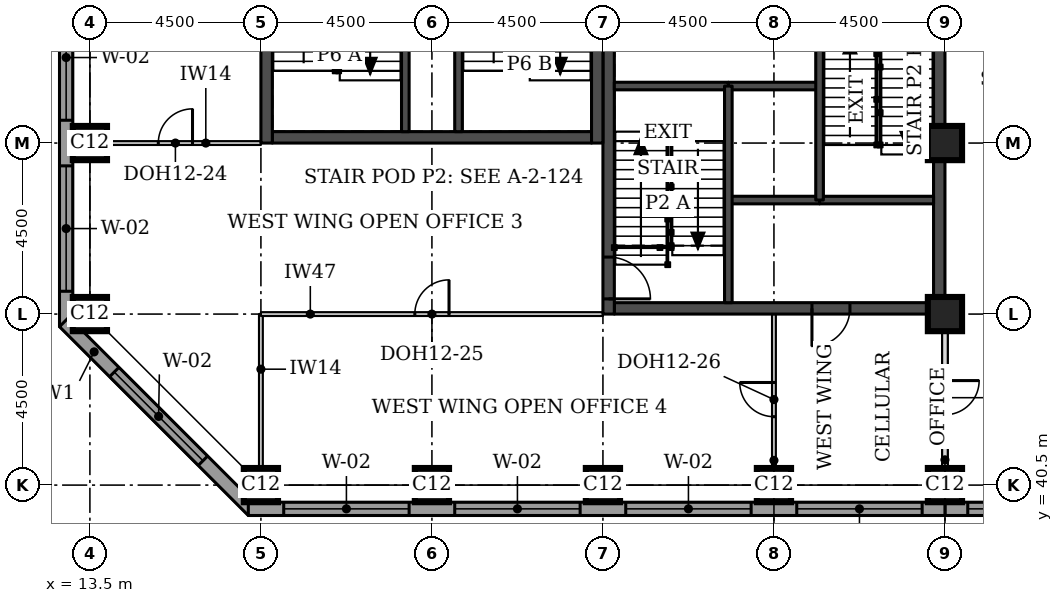
"""IFC4 building model, lengths in metres.
Left out: names, types, materials, properties, quantities, classifications, styles, units other than length and angle.
Written with IfcOpenShell. Run it as: python <this file> out.ifc"""

import sys

from ifc_helpers import new_model, si_unit, direction, frame, frame_2d, origin, origin_2d, place, context, subcontext, project, spatial, rectangle, extrude, element, fill, save


model = new_model("IFC4")
c1 = context("Model", 3, precision=1e-05, world=origin(), true_north=direction((0.0, 1.0)))
c2 = subcontext(c1, "Body", "Model", "MODEL_VIEW")
j1 = project(units=[si_unit("LENGTHUNIT", "METRE"), si_unit("PLANEANGLEUNIT", "RADIAN")], contexts=[c1])
p1 = place(None, origin())
s1 = spatial("IfcSite", under=j1, at=p1, CompositionType="ELEMENT")
p2 = place(p1, origin())
s2 = spatial("IfcBuilding", under=s1, at=p2, CompositionType="ELEMENT")
p3 = place(p2, frame((0.0, 0.0, 252.6)))
s3 = spatial("IfcBuildingStorey", under=s2, at=p3, CompositionType="ELEMENT", Elevation=252.6)
for number, where, z_axis, x_axis in (
    (1, (18.0, 40.5, 0.0), (0.0, 0.0, 1.0), (1.0, 0.0, 0.0)),
    (2, (22.5, 40.5, 0.0), (0.0, 0.0, 1.0), (1.0, 0.0, 0.0)),
    (3, (27.0, 40.5, 0.0), (0.0, 0.0, 1.0), (1.0, 0.0, 0.0)),
    (4, (31.5, 40.5, 0.0), (0.0, 0.0, 1.0), (1.0, 0.0, 0.0)),
    (5, (36.0, 40.5, 0.0), (0.0, 0.0, 1.0), (1.0, 0.0, 0.0)),
    (6, (13.5, 45.0, 0.0), (0.0, 0.0, 1.0), (1.0, 0.0, 0.0)),
    (7, (36.0, 45.0, 0.0), (0.0, 0.0, 1.0), (1.0, 0.0, 0.0)),
    (8, (13.5, 49.5, 0.0), (0.0, 0.0, 1.0), (1.0, 0.0, 0.0)),
    (9, (36.0, 49.5, 0.0), (0.0, 0.0, 1.0), (1.0, 0.0, 0.0)),
):
    element("IfcColumn", number, at=place(p3, frame(where, z_axis=z_axis, x_axis=x_axis)), inside=s3, PredefinedType="COLUMN", context=c2, shape_type="SweptSolid", body=[
        extrude(rectangle(XDim=0.9, YDim=0.9, at=origin_2d()), origin(), (0.0, 0.0, 1.0), 3.7),
    ])
p4 = place(p3, frame((27.3, 45.15, 0.0), z_axis=(0.0, 0.0, 1.0), x_axis=(1.0, 0.0, 0.0)))
e10 = element("IfcWall", 10, at=p4, inside=s3, PredefinedType="SHEAR", context=c2, shape_type="SweptSolid", body=[
    extrude(rectangle(XDim=8.4, YDim=0.3, at=frame_2d((4.2, 0.0))), origin(), (0.0, 0.0, 1.0), 3.7),
])
p5 = place(p4, frame((5.2, 0.0, 0.0)))
e11 = element("IfcOpeningElement", 11, at=p5, cuts=e10, PredefinedType="OPENING", context=c2, shape_type="SweptSolid", body=[
    extrude(rectangle(XDim=1.0, YDim=2.1, at=frame_2d((0.5, 1.05))), frame((0.0, 0.16, 0.0), z_axis=(0.0, -1.0, 0.0), x_axis=(1.0, 0.0, 0.0)), (0.0, 0.0, 1.0), 0.32),
])
p6 = place(p3, frame((27.15, 45.0, 0.0), z_axis=(0.0, 0.0, 1.0), x_axis=(0.0, 1.0, 0.0)))
e12 = element("IfcWall", 12, at=p6, inside=s3, PredefinedType="SHEAR", context=c2, shape_type="SweptSolid", body=[
    extrude(rectangle(XDim=9.0, YDim=0.3, at=frame_2d((4.5, 0.0))), origin(), (0.0, 0.0, 1.0), 3.7),
])
p7 = place(p6, frame((0.4, 0.0, 0.0)))
e13 = element("IfcOpeningElement", 13, at=p7, cuts=e12, PredefinedType="OPENING", context=c2, shape_type="SweptSolid", body=[
    extrude(rectangle(XDim=1.1, YDim=2.1, at=frame_2d((0.55, 1.05))), frame((0.0, 0.16, 0.0), z_axis=(0.0, -1.0, 0.0), x_axis=(1.0, 0.0, 0.0)), (0.0, 0.0, 1.0), 0.32),
])
p8 = place(p3, frame((35.85, 45.0, 0.0), z_axis=(0.0, 0.0, 1.0), x_axis=(0.0, 1.0, 0.0)))
e14 = element("IfcWall", 14, at=p8, inside=s3, PredefinedType="SHEAR", context=c2, shape_type="SweptSolid", body=[
    extrude(rectangle(XDim=9.0, YDim=0.3, at=frame_2d((4.5, 0.0))), origin(), (0.0, 0.0, 1.0), 3.7),
])
p9 = place(p3, frame((18.3, 49.65, 0.0), z_axis=(0.0, 0.0, 1.0), x_axis=(1.0, 0.0, 0.0)))
e15 = element("IfcWall", 15, at=p9, inside=s3, PredefinedType="SHEAR", context=c2, shape_type="SweptSolid", body=[
    extrude(rectangle(XDim=8.4, YDim=0.3, at=frame_2d((4.2, 0.0))), origin(), (0.0, 0.0, 1.0), 3.7),
])
p10 = place(p3, frame((18.15, 49.5, 0.0), z_axis=(0.0, 0.0, 1.0), x_axis=(0.0, 1.0, 0.0)))
e16 = element("IfcWall", 16, at=p10, inside=s3, PredefinedType="SHEAR", context=c2, shape_type="SweptSolid", body=[
    extrude(rectangle(XDim=9.0, YDim=0.3, at=frame_2d((4.5, 0.0))), origin(), (0.0, 0.0, 1.0), 3.7),
])
p11 = place(p3, frame((26.85, 49.5, 0.0), z_axis=(0.0, 0.0, 1.0), x_axis=(0.0, 1.0, 0.0)))
e17 = element("IfcWall", 17, at=p11, inside=s3, PredefinedType="SHEAR", context=c2, shape_type="SweptSolid", body=[
    extrude(rectangle(XDim=9.0, YDim=0.3, at=frame_2d((4.5, 0.0))), origin(), (0.0, 0.0, 1.0), 3.7),
])
p12 = place(p11, frame((6.6, 0.0, 0.0)))
e18 = element("IfcOpeningElement", 18, at=p12, cuts=e17, PredefinedType="OPENING", context=c2, shape_type="SweptSolid", body=[
    extrude(rectangle(XDim=1.8, YDim=2.1, at=frame_2d((0.9, 1.05))), frame((0.0, 0.16, 0.0), z_axis=(0.0, -1.0, 0.0), x_axis=(1.0, 0.0, 0.0)), (0.0, 0.0, 1.0), 0.32),
])
p13 = place(p3, frame((36.0, 39.875, 0.0), z_axis=(0.0, 0.0, 1.0), x_axis=(1.0, 0.0, 0.0)))
e19 = element("IfcWall", 19, at=p13, inside=s3, PredefinedType="STANDARD", context=c2, shape_type="SweptSolid", body=[
    extrude(rectangle(XDim=36.331, YDim=0.35, at=frame_2d((18.166, 0.0))), origin(), (0.0, 0.0, 1.0), 3.525),
])
p14 = place(p13, frame((0.6, 0.0, 0.9)))
e20 = element("IfcOpeningElement", 20, at=p14, cuts=e19, PredefinedType="OPENING", context=c2, shape_type="SweptSolid", body=[
    extrude(rectangle(XDim=3.3, YDim=1.9, at=frame_2d((1.65, 0.95))), frame((0.0, 0.185, 0.0), z_axis=(0.0, -1.0, 0.0), x_axis=(1.0, 0.0, 0.0)), (0.0, 0.0, 1.0), 0.37),
])
p15 = place(p13, frame((5.1, 0.0, 0.9)))
e21 = element("IfcOpeningElement", 21, at=p15, cuts=e19, PredefinedType="OPENING", context=c2, shape_type="SweptSolid", body=[
    extrude(rectangle(XDim=3.3, YDim=1.9, at=frame_2d((1.65, 0.95))), frame((0.0, 0.185, 0.0), z_axis=(0.0, -1.0, 0.0), x_axis=(1.0, 0.0, 0.0)), (0.0, 0.0, 1.0), 0.37),
])
p16 = place(p13, frame((9.6, 0.0, 0.9)))
e22 = element("IfcOpeningElement", 22, at=p16, cuts=e19, PredefinedType="OPENING", context=c2, shape_type="SweptSolid", body=[
    extrude(rectangle(XDim=3.3, YDim=1.9, at=frame_2d((1.65, 0.95))), frame((0.0, 0.185, 0.0), z_axis=(0.0, -1.0, 0.0), x_axis=(1.0, 0.0, 0.0)), (0.0, 0.0, 1.0), 0.37),
])
p17 = place(p13, frame((14.1, 0.0, 0.9)))
e23 = element("IfcOpeningElement", 23, at=p17, cuts=e19, PredefinedType="OPENING", context=c2, shape_type="SweptSolid", body=[
    extrude(rectangle(XDim=3.3, YDim=1.9, at=frame_2d((1.65, 0.95))), frame((0.0, 0.185, 0.0), z_axis=(0.0, -1.0, 0.0), x_axis=(1.0, 0.0, 0.0)), (0.0, 0.0, 1.0), 0.37),
])
p18 = place(p13, frame((18.6, 0.0, 0.9)))
e24 = element("IfcOpeningElement", 24, at=p18, cuts=e19, PredefinedType="OPENING", context=c2, shape_type="SweptSolid", body=[
    extrude(rectangle(XDim=3.3, YDim=1.9, at=frame_2d((1.65, 0.95))), frame((0.0, 0.185, 0.0), z_axis=(0.0, -1.0, 0.0), x_axis=(1.0, 0.0, 0.0)), (0.0, 0.0, 1.0), 0.37),
])
p19 = place(p13, frame((23.1, 0.0, 0.9)))
e25 = element("IfcOpeningElement", 25, at=p19, cuts=e19, PredefinedType="OPENING", context=c2, shape_type="SweptSolid", body=[
    extrude(rectangle(XDim=3.3, YDim=1.9, at=frame_2d((1.65, 0.95))), frame((0.0, 0.185, 0.0), z_axis=(0.0, -1.0, 0.0), x_axis=(1.0, 0.0, 0.0)), (0.0, 0.0, 1.0), 0.37),
])
p20 = place(p13, frame((27.6, 0.0, 0.9)))
e26 = element("IfcOpeningElement", 26, at=p20, cuts=e19, PredefinedType="OPENING", context=c2, shape_type="SweptSolid", body=[
    extrude(rectangle(XDim=3.3, YDim=1.9, at=frame_2d((1.65, 0.95))), frame((0.0, 0.185, 0.0), z_axis=(0.0, -1.0, 0.0), x_axis=(1.0, 0.0, 0.0)), (0.0, 0.0, 1.0), 0.37),
])
p21 = place(p13, frame((32.1, 0.0, 0.9)))
e27 = element("IfcOpeningElement", 27, at=p21, cuts=e19, PredefinedType="OPENING", context=c2, shape_type="SweptSolid", body=[
    extrude(rectangle(XDim=3.3, YDim=1.9, at=frame_2d((1.65, 0.95))), frame((0.0, 0.185, 0.0), z_axis=(0.0, -1.0, 0.0), x_axis=(1.0, 0.0, 0.0)), (0.0, 0.0, 1.0), 0.37),
])
p22 = place(p3, frame((12.875, 58.831, 0.0), z_axis=(0.0, 0.0, 1.0), x_axis=(0.0, -1.0, 0.0)))
e28 = element("IfcWall", 28, at=p22, inside=s3, PredefinedType="STANDARD", context=c2, shape_type="SweptSolid", body=[
    extrude(rectangle(XDim=14.163, YDim=0.35, at=frame_2d((7.081, 0.0))), origin(), (0.0, 0.0, 1.0), 3.525),
])
p23 = place(p22, frame((0.931, 0.0, 0.9)))
e29 = element("IfcOpeningElement", 29, at=p23, cuts=e28, PredefinedType="OPENING", context=c2, shape_type="SweptSolid", body=[
    extrude(rectangle(XDim=3.3, YDim=1.9, at=frame_2d((1.65, 0.95))), frame((0.0, 0.185, 0.0), z_axis=(0.0, -1.0, 0.0), x_axis=(1.0, 0.0, 0.0)), (0.0, 0.0, 1.0), 0.37),
])
p24 = place(p22, frame((5.431, 0.0, 0.9)))
e30 = element("IfcOpeningElement", 30, at=p24, cuts=e28, PredefinedType="OPENING", context=c2, shape_type="SweptSolid", body=[
    extrude(rectangle(XDim=3.3, YDim=1.9, at=frame_2d((1.65, 0.95))), frame((0.0, 0.185, 0.0), z_axis=(0.0, -1.0, 0.0), x_axis=(1.0, 0.0, 0.0)), (0.0, 0.0, 1.0), 0.37),
])
p25 = place(p22, frame((9.931, 0.0, 0.9)))
e31 = element("IfcOpeningElement", 31, at=p25, cuts=e28, PredefinedType="OPENING", context=c2, shape_type="SweptSolid", body=[
    extrude(rectangle(XDim=3.3, YDim=1.9, at=frame_2d((1.65, 0.95))), frame((0.0, 0.185, 0.0), z_axis=(0.0, -1.0, 0.0), x_axis=(1.0, 0.0, 0.0)), (0.0, 0.0, 1.0), 0.37),
])
p26 = place(p3, frame((12.824, 44.792, 0.0), z_axis=(0.0, 0.0, 1.0), x_axis=(0.707106781187, -0.707106781187, 0.0)))
e32 = element("IfcWall", 32, at=p26, inside=s3, PredefinedType="STANDARD", context=c2, shape_type="SweptSolid", body=[
    extrude(rectangle(XDim=7.027, YDim=0.35, at=frame_2d((3.513, 0.0))), origin(), (0.0, 0.0, 1.0), 3.525),
])
p27 = place(p26, frame((1.863, 0.0, 0.9)))
e33 = element("IfcOpeningElement", 33, at=p27, cuts=e32, PredefinedType="OPENING", context=c2, shape_type="SweptSolid", body=[
    extrude(rectangle(XDim=3.3, YDim=1.9, at=frame_2d((1.65, 0.95))), frame((0.0, 0.185, 0.0), z_axis=(0.0, -1.0, 0.0), x_axis=(1.0, 0.0, 0.0)), (0.0, 0.0, 1.0), 0.37),
])
p28 = place(p3, frame((17.669, 39.875, 0.0), z_axis=(0.0, 0.0, 1.0), x_axis=(1.0, 0.0, 0.0)))
e34 = element("IfcWall", 34, at=p28, inside=s3, PredefinedType="STANDARD", context=c2, shape_type="SweptSolid", body=[
    extrude(rectangle(XDim=18.331, YDim=0.35, at=frame_2d((9.166, 0.0))), origin(), (0.0, 0.0, 1.0), 3.525),
])
p29 = place(p28, frame((0.931, 0.0, 0.9)))
e35 = element("IfcOpeningElement", 35, at=p29, cuts=e34, PredefinedType="OPENING", context=c2, shape_type="SweptSolid", body=[
    extrude(rectangle(XDim=3.3, YDim=1.9, at=frame_2d((1.65, 0.95))), frame((0.0, 0.185, 0.0), z_axis=(0.0, -1.0, 0.0), x_axis=(1.0, 0.0, 0.0)), (0.0, 0.0, 1.0), 0.37),
])
p30 = place(p28, frame((5.431, 0.0, 0.9)))
e36 = element("IfcOpeningElement", 36, at=p30, cuts=e34, PredefinedType="OPENING", context=c2, shape_type="SweptSolid", body=[
    extrude(rectangle(XDim=3.3, YDim=1.9, at=frame_2d((1.65, 0.95))), frame((0.0, 0.185, 0.0), z_axis=(0.0, -1.0, 0.0), x_axis=(1.0, 0.0, 0.0)), (0.0, 0.0, 1.0), 0.37),
])
p31 = place(p28, frame((9.931, 0.0, 0.9)))
e37 = element("IfcOpeningElement", 37, at=p31, cuts=e34, PredefinedType="OPENING", context=c2, shape_type="SweptSolid", body=[
    extrude(rectangle(XDim=3.3, YDim=1.9, at=frame_2d((1.65, 0.95))), frame((0.0, 0.185, 0.0), z_axis=(0.0, -1.0, 0.0), x_axis=(1.0, 0.0, 0.0)), (0.0, 0.0, 1.0), 0.37),
])
p32 = place(p28, frame((14.431, 0.0, 0.9)))
e38 = element("IfcOpeningElement", 38, at=p32, cuts=e34, PredefinedType="OPENING", context=c2, shape_type="SweptSolid", body=[
    extrude(rectangle(XDim=3.3, YDim=1.9, at=frame_2d((1.65, 0.95))), frame((0.0, 0.185, 0.0), z_axis=(0.0, -1.0, 0.0), x_axis=(1.0, 0.0, 0.0)), (0.0, 0.0, 1.0), 0.37),
])
p33 = place(p3, frame((36.0, 40.95, 0.0), z_axis=(0.0, 0.0, 1.0), x_axis=(0.0, 1.0, 0.0)))
e39 = element("IfcWall", 39, at=p33, inside=s3, PredefinedType="PARTITIONING", context=c2, shape_type="SweptSolid", body=[
    extrude(rectangle(XDim=3.63, YDim=0.15, at=frame_2d((1.815, 0.0))), origin(), (0.0, 0.0, 1.0), 2.8),
])
p34 = place(p33, frame((1.4, 0.0, 0.0)))
e40 = element("IfcOpeningElement", 40, at=p34, cuts=e39, PredefinedType="OPENING", context=c2, shape_type="SweptSolid", body=[
    extrude(rectangle(XDim=0.9, YDim=2.1, at=frame_2d((0.45, 1.05))), frame((0.0, 0.085, 0.0), z_axis=(0.0, -1.0, 0.0), x_axis=(1.0, 0.0, 0.0)), (0.0, 0.0, 1.0), 0.17),
])
p35 = place(p3, frame((13.5, 49.5, 0.0), z_axis=(0.0, 0.0, 1.0), x_axis=(1.0, 0.0, 0.0)))
e41 = element("IfcWall", 41, at=p35, inside=s3, PredefinedType="PARTITIONING", context=c2, shape_type="SweptSolid", body=[
    extrude(rectangle(XDim=4.5, YDim=0.1, at=frame_2d((2.25, 0.0))), origin(), (0.0, 0.0, 1.0), 3.55),
])
p36 = place(p35, frame((1.8, 0.0, 0.0)))
e42 = element("IfcOpeningElement", 42, at=p36, cuts=e41, PredefinedType="OPENING", context=c2, shape_type="SweptSolid", body=[
    extrude(rectangle(XDim=0.9, YDim=2.1, at=frame_2d((0.45, 1.05))), frame((0.0, 0.06, 0.0), z_axis=(0.0, -1.0, 0.0), x_axis=(1.0, 0.0, 0.0)), (0.0, 0.0, 1.0), 0.12),
])
p37 = place(p3, frame((18.0, 40.5, 0.0), z_axis=(0.0, 0.0, 1.0), x_axis=(0.0, 1.0, 0.0)))
e43 = element("IfcWall", 43, at=p37, inside=s3, PredefinedType="PARTITIONING", context=c2, shape_type="SweptSolid", body=[
    extrude(rectangle(XDim=4.5, YDim=0.1, at=frame_2d((2.25, 0.0))), origin(), (0.0, 0.0, 1.0), 3.55),
])
p38 = place(p3, frame((18.0, 45.0, 0.0), z_axis=(0.0, 0.0, 1.0), x_axis=(1.0, 0.0, 0.0)))
e44 = element("IfcWall", 44, at=p38, inside=s3, PredefinedType="PARTITIONING", context=c2, shape_type="SweptSolid", body=[
    extrude(rectangle(XDim=9.0, YDim=0.1, at=frame_2d((4.5, 0.0))), origin(), (0.0, 0.0, 1.0), 2.55),
])
p39 = place(p38, frame((4.05, 0.0, 0.0)))
e45 = element("IfcOpeningElement", 45, at=p39, cuts=e44, PredefinedType="OPENING", context=c2, shape_type="SweptSolid", body=[
    extrude(rectangle(XDim=0.9, YDim=2.1, at=frame_2d((0.45, 1.05))), frame((0.0, 0.06, 0.0), z_axis=(0.0, -1.0, 0.0), x_axis=(1.0, 0.0, 0.0)), (0.0, 0.0, 1.0), 0.12),
])
p40 = place(p3, frame((31.5, 45.0, 0.0), z_axis=(0.0, 0.0, 1.0), x_axis=(0.0, -1.0, 0.0)))
e46 = element("IfcWall", 46, at=p40, inside=s3, PredefinedType="PARTITIONING", context=c2, shape_type="SweptSolid", body=[
    extrude(rectangle(XDim=4.5, YDim=0.1, at=frame_2d((2.25, 0.0))), origin(), (0.0, 0.0, 1.0), 3.55),
])
p41 = place(p40, frame((1.8, 0.0, 0.0)))
e47 = element("IfcOpeningElement", 47, at=p41, cuts=e46, PredefinedType="OPENING", context=c2, shape_type="SweptSolid", body=[
    extrude(rectangle(XDim=0.9, YDim=2.1, at=frame_2d((0.45, 1.05))), frame((0.0, 0.06, 0.0), z_axis=(0.0, -1.0, 0.0), x_axis=(1.0, 0.0, 0.0)), (0.0, 0.0, 1.0), 0.12),
])
p42 = place(p3, frame((30.3, 48.0, 0.0), z_axis=(0.0, 0.0, 1.0), x_axis=(1.0, 0.0, 0.0)))
e48 = element("IfcWall", 48, at=p42, inside=s3, PredefinedType="SOLIDWALL", context=c2, shape_type="SweptSolid", body=[
    extrude(rectangle(XDim=2.4, YDim=0.2, at=frame_2d((1.2, 0.0))), origin(), (0.0, 0.0, 1.0), 3.55),
])
p43 = place(p3, frame((32.7, 48.0, 0.0), z_axis=(0.0, 0.0, 1.0), x_axis=(1.0, 0.0, 0.0)))
e49 = element("IfcWall", 49, at=p43, inside=s3, PredefinedType="SOLIDWALL", context=c2, shape_type="SweptSolid", body=[
    extrude(rectangle(XDim=3.0, YDim=0.2, at=frame_2d((1.5, 0.0))), origin(), (0.0, 0.0, 1.0), 3.55),
])
p44 = place(p3, frame((30.3, 51.0, 0.0), z_axis=(0.0, 0.0, 1.0), x_axis=(1.0, 0.0, 0.0)))
e50 = element("IfcWall", 50, at=p44, inside=s3, PredefinedType="SOLIDWALL", context=c2, shape_type="SweptSolid", body=[
    extrude(rectangle(XDim=2.4, YDim=0.2, at=frame_2d((1.2, 0.0))), origin(), (0.0, 0.0, 1.0), 3.7),
])
p45 = place(p3, frame((27.3, 51.0, 0.0), z_axis=(0.0, 0.0, 1.0), x_axis=(1.0, 0.0, 0.0)))
e51 = element("IfcWall", 51, at=p45, inside=s3, PredefinedType="SOLIDWALL", context=c2, shape_type="SweptSolid", body=[
    extrude(rectangle(XDim=3.0, YDim=0.2, at=frame_2d((1.5, 0.0))), origin(), (0.0, 0.0, 1.0), 3.55),
])
for number, where, z_axis, x_axis in (
    (52, (30.3, 45.3, 0.0), (0.0, 0.0, 1.0), (0.0, 1.0, 0.0)),
    (53, (32.7, 48.0, 0.0), (0.0, 0.0, 1.0), (0.0, 1.0, 0.0)),
):
    element("IfcWall", number, at=place(p3, frame(where, z_axis=z_axis, x_axis=x_axis)), inside=s3, PredefinedType="SOLIDWALL", context=c2, shape_type="SweptSolid", body=[
        extrude(rectangle(XDim=5.7, YDim=0.2, at=frame_2d((2.85, 0.0))), origin(), (0.0, 0.0, 1.0), 3.55),
    ])
for number, where, z_axis, x_axis in (
    (54, (21.8, 49.8, 0.0), (0.0, 0.0, 1.0), (0.0, 1.0, 0.0)),
    (55, (23.2, 49.8, 0.0), (0.0, 0.0, 1.0), (0.0, 1.0, 0.0)),
):
    element("IfcWall", number, at=place(p3, frame(where, z_axis=z_axis, x_axis=x_axis)), inside=s3, PredefinedType="SOLIDWALL", context=c2, shape_type="SweptSolid", body=[
        extrude(rectangle(XDim=6.05, YDim=0.2, at=frame_2d((3.025, 0.0))), origin(), (0.0, 0.0, 1.0), 3.55),
    ])
p46 = place(p14, origin())
e56 = element("IfcWindow", 56, at=p46, inside=s3, PartitioningType="SINGLE_PANEL", PredefinedType="WINDOW", context=c2, shape_type="SweptSolid", body=[
    extrude(rectangle(XDim=3.3, YDim=1.9, at=frame_2d((1.65, 0.95))), frame((0.0, 0.085, 0.0), z_axis=(0.0, -1.0, 0.0), x_axis=(1.0, 0.0, 0.0)), (0.0, 0.0, 1.0), 0.06),
])
fill(e20, e56)
p47 = place(p24, origin())
e57 = element("IfcWindow", 57, at=p47, inside=s3, PartitioningType="SINGLE_PANEL", PredefinedType="WINDOW", context=c2, shape_type="SweptSolid", body=[
    extrude(rectangle(XDim=3.3, YDim=1.9, at=frame_2d((1.65, 0.95))), frame((0.0, 0.085, 0.0), z_axis=(0.0, -1.0, 0.0), x_axis=(1.0, 0.0, 0.0)), (0.0, 0.0, 1.0), 0.06),
])
fill(e30, e57)
p48 = place(p25, origin())
e58 = element("IfcWindow", 58, at=p48, inside=s3, PartitioningType="SINGLE_PANEL", PredefinedType="WINDOW", context=c2, shape_type="SweptSolid", body=[
    extrude(rectangle(XDim=3.3, YDim=1.9, at=frame_2d((1.65, 0.95))), frame((0.0, 0.085, 0.0), z_axis=(0.0, -1.0, 0.0), x_axis=(1.0, 0.0, 0.0)), (0.0, 0.0, 1.0), 0.06),
])
fill(e31, e58)
p49 = place(p27, origin())
e59 = element("IfcWindow", 59, at=p49, inside=s3, PartitioningType="SINGLE_PANEL", PredefinedType="WINDOW", context=c2, shape_type="SweptSolid", body=[
    extrude(rectangle(XDim=3.3, YDim=1.9, at=frame_2d((1.65, 0.95))), frame((0.0, 0.085, 0.0), z_axis=(0.0, -1.0, 0.0), x_axis=(1.0, 0.0, 0.0)), (0.0, 0.0, 1.0), 0.06),
])
fill(e33, e59)
p50 = place(p29, origin())
e60 = element("IfcWindow", 60, at=p50, inside=s3, PartitioningType="SINGLE_PANEL", PredefinedType="WINDOW", context=c2, shape_type="SweptSolid", body=[
    extrude(rectangle(XDim=3.3, YDim=1.9, at=frame_2d((1.65, 0.95))), frame((0.0, 0.085, 0.0), z_axis=(0.0, -1.0, 0.0), x_axis=(1.0, 0.0, 0.0)), (0.0, 0.0, 1.0), 0.06),
])
fill(e35, e60)
p51 = place(p30, origin())
e61 = element("IfcWindow", 61, at=p51, inside=s3, PartitioningType="SINGLE_PANEL", PredefinedType="WINDOW", context=c2, shape_type="SweptSolid", body=[
    extrude(rectangle(XDim=3.3, YDim=1.9, at=frame_2d((1.65, 0.95))), frame((0.0, 0.085, 0.0), z_axis=(0.0, -1.0, 0.0), x_axis=(1.0, 0.0, 0.0)), (0.0, 0.0, 1.0), 0.06),
])
fill(e36, e61)
p52 = place(p31, origin())
e62 = element("IfcWindow", 62, at=p52, inside=s3, PartitioningType="SINGLE_PANEL", PredefinedType="WINDOW", context=c2, shape_type="SweptSolid", body=[
    extrude(rectangle(XDim=3.3, YDim=1.9, at=frame_2d((1.65, 0.95))), frame((0.0, 0.085, 0.0), z_axis=(0.0, -1.0, 0.0), x_axis=(1.0, 0.0, 0.0)), (0.0, 0.0, 1.0), 0.06),
])
fill(e37, e62)
p53 = place(p32, origin())
e63 = element("IfcWindow", 63, at=p53, inside=s3, PartitioningType="SINGLE_PANEL", PredefinedType="WINDOW", context=c2, shape_type="SweptSolid", body=[
    extrude(rectangle(XDim=3.3, YDim=1.9, at=frame_2d((1.65, 0.95))), frame((0.0, 0.085, 0.0), z_axis=(0.0, -1.0, 0.0), x_axis=(1.0, 0.0, 0.0)), (0.0, 0.0, 1.0), 0.06),
])
fill(e38, e63)
p54 = place(p34, frame((0.9, 0.0, 0.0), z_axis=(0.0, 0.0, 1.0), x_axis=(-1.0, 0.0, 0.0)))
e64 = element("IfcDoor", 64, at=p54, inside=s3, OperationType="SINGLE_SWING_LEFT", PredefinedType="DOOR", context=c2, shape_type="SweptSolid", body=[
    extrude(rectangle(XDim=0.9, YDim=2.1, at=frame_2d((0.45, 1.05))), frame((0.0, 0.025, 0.0), z_axis=(0.0, -1.0, 0.0), x_axis=(1.0, 0.0, 0.0)), (0.0, 0.0, 1.0), 0.05),
])
fill(e40, e64)
p55 = place(p36, origin())
e65 = element("IfcDoor", 65, at=p55, inside=s3, OperationType="SINGLE_SWING_RIGHT", PredefinedType="DOOR", context=c2, shape_type="SweptSolid", body=[
    extrude(rectangle(XDim=0.9, YDim=2.1, at=frame_2d((0.45, 1.05))), frame((0.0, 0.025, 0.0), z_axis=(0.0, -1.0, 0.0), x_axis=(1.0, 0.0, 0.0)), (0.0, 0.0, 1.0), 0.05),
])
fill(e42, e65)
p56 = place(p39, origin())
e66 = element("IfcDoor", 66, at=p56, inside=s3, OperationType="SINGLE_SWING_RIGHT", PredefinedType="DOOR", context=c2, shape_type="SweptSolid", body=[
    extrude(rectangle(XDim=0.9, YDim=2.1, at=frame_2d((0.45, 1.05))), frame((0.0, 0.025, 0.0), z_axis=(0.0, -1.0, 0.0), x_axis=(1.0, 0.0, 0.0)), (0.0, 0.0, 1.0), 0.05),
])
fill(e45, e66)
p57 = place(p41, frame((0.9, 0.0, 0.0), z_axis=(0.0, 0.0, 1.0), x_axis=(-1.0, 0.0, 0.0)))
e67 = element("IfcDoor", 67, at=p57, inside=s3, OperationType="SINGLE_SWING_RIGHT", PredefinedType="DOOR", context=c2, shape_type="SweptSolid", body=[
    extrude(rectangle(XDim=0.9, YDim=2.1, at=frame_2d((0.45, 1.05))), frame((0.0, 0.025, 0.0), z_axis=(0.0, -1.0, 0.0), x_axis=(1.0, 0.0, 0.0)), (0.0, 0.0, 1.0), 0.05),
])
fill(e47, e67)
p58 = place(p7, frame((1.1, 0.0, 0.0), z_axis=(0.0, 0.0, 1.0), x_axis=(-1.0, 0.0, 0.0)))
e68 = element("IfcDoor", 68, at=p58, inside=s3, OperationType="SINGLE_SWING_RIGHT", PredefinedType="DOOR", context=c2, shape_type="SweptSolid", body=[
    extrude(rectangle(XDim=1.1, YDim=2.1, at=frame_2d((0.55, 1.05))), frame((0.0, 0.025, 0.0), z_axis=(0.0, -1.0, 0.0), x_axis=(1.0, 0.0, 0.0)), (0.0, 0.0, 1.0), 0.05),
])
fill(e13, e68)
p59 = place(p5, frame((1.0, 0.0, 0.0), z_axis=(0.0, 0.0, 1.0), x_axis=(-1.0, 0.0, 0.0)))
e69 = element("IfcDoor", 69, at=p59, inside=s3, OperationType="SINGLE_SWING_RIGHT", PredefinedType="DOOR", context=c2, shape_type="SweptSolid", body=[
    extrude(rectangle(XDim=1.0, YDim=2.1, at=frame_2d((0.5, 1.05))), frame((0.0, 0.025, 0.0), z_axis=(0.0, -1.0, 0.0), x_axis=(1.0, 0.0, 0.0)), (0.0, 0.0, 1.0), 0.05),
])
fill(e11, e69)
save(model, sys.argv[1])
